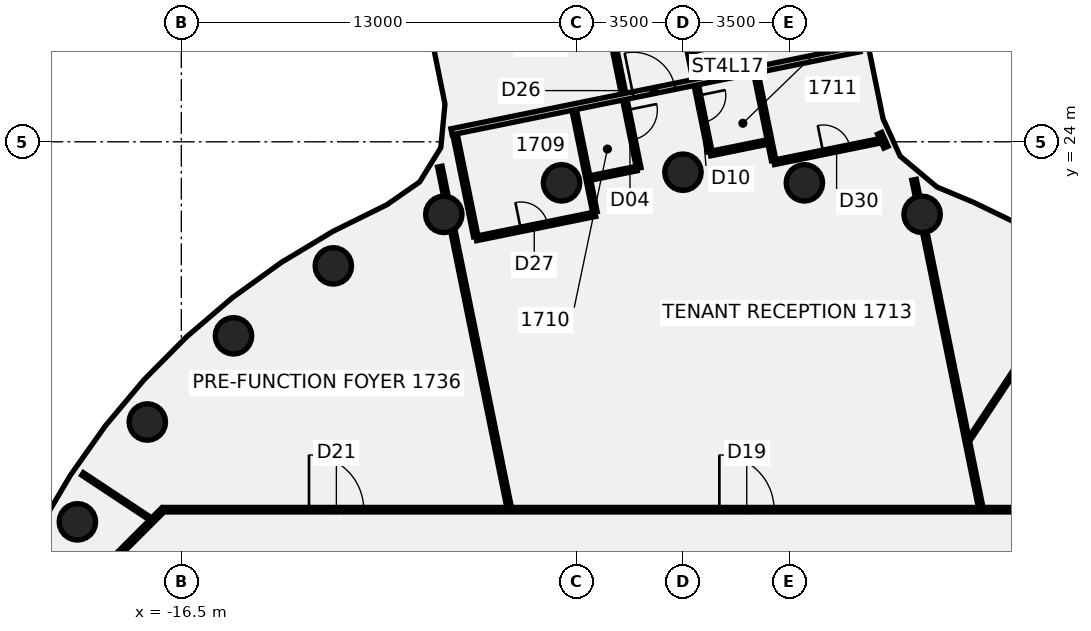
"""IFC4 building model, lengths in metres.
Left out: names, types, materials, properties, quantities, classifications, styles, units other than length and angle.
Written with IfcOpenShell. Run it as: python <this file> out.ifc"""

import sys

from ifc_helpers import new_model, si_unit, direction, frame, frame_2d, origin, origin_2d, place, context, subcontext, project, spatial, rectangle, circle, extrude, element, fill, save


model = new_model("IFC4")
c1 = context("Model", 3, precision=1e-05, world=origin(), true_north=direction((0.0, 1.0)))
c2 = subcontext(c1, "Body", "Model", "MODEL_VIEW")
j1 = project(units=[si_unit("LENGTHUNIT", "METRE"), si_unit("PLANEANGLEUNIT", "RADIAN")], contexts=[c1])
p1 = place(None, origin())
s1 = spatial("IfcSite", under=j1, at=p1, CompositionType="ELEMENT")
p2 = place(p1, origin())
s2 = spatial("IfcBuilding", under=s1, at=p2, CompositionType="ELEMENT")
p3 = place(p2, frame((0.0, 0.0, 75.25)))
s3 = spatial("IfcBuildingStorey", under=s2, at=p3, CompositionType="ELEMENT", Elevation=75.25)
for number, where, z_axis, x_axis in (
    (1, (7.866, 21.613, -0.14), (0.0, 0.0, 1.0), (1.0, 0.0, 0.0)),
    (2, (3.994, 22.651, -0.14), (0.0, 0.0, 1.0), (1.0, 0.0, 0.0)),
    (3, (0.0, 23.0, -0.14), (0.0, 0.0, 1.0), (1.0, 0.0, 0.0)),
    (4, (-3.994, 22.651, -0.14), (0.0, 0.0, 1.0), (1.0, 0.0, 0.0)),
    (5, (-7.866, 21.613, -0.14), (0.0, 0.0, 1.0), (1.0, 0.0, 0.0)),
    (6, (-11.5, 19.919, -0.14), (0.0, 0.0, 1.0), (1.0, 0.0, 0.0)),
    (7, (-14.784, 17.619, -0.14), (0.0, 0.0, 1.0), (1.0, 0.0, 0.0)),
    (8, (-17.619, 14.784, -0.14), (0.0, 0.0, 1.0), (1.0, 0.0, 0.0)),
    (9, (-19.919, 11.5, -0.14), (0.0, 0.0, 1.0), (1.0, 0.0, 0.0)),
):
    element("IfcColumn", number, at=place(p3, frame(where, z_axis=z_axis, x_axis=x_axis)), inside=s3, PredefinedType="COLUMN", context=c2, shape_type="SweptSolid", body=[
        extrude(circle(Radius=0.6, at=origin_2d()), origin(), (0.0, 0.0, 1.0), 3.71),
    ])
p4 = place(p3, frame((-7.997, 23.185, 0.0), z_axis=(0.0, 0.0, 1.0), x_axis=(0.199166137736, -0.979965738982, 0.0)))
e10 = element("IfcWall", 10, at=p4, inside=s3, PredefinedType="PARTITIONING", context=c2, shape_type="SweptSolid", body=[
    extrude(rectangle(XDim=1.0, YDim=0.15, at=frame_2d((0.5, 0.0))), origin(), (0.0, 0.0, 1.0), 2.97),
])
p5 = place(p3, frame((-7.569, 21.083, 0.0), z_axis=(0.0, 0.0, 1.0), x_axis=(0.199292052779, -0.979940139855, 0.0)))
e11 = element("IfcWall", 11, at=p5, inside=s3, PredefinedType="PARTITIONING", context=c2, shape_type="SweptSolid", body=[
    extrude(rectangle(XDim=9.296, YDim=0.15, at=frame_2d((4.648, 0.0))), origin(), (0.0, 0.0, 1.0), 2.97),
])
p6 = place(p3, frame((-7.499, 24.251, 0.0), z_axis=(0.0, 0.0, 1.0), x_axis=(0.199153914045, -0.97996822322, 0.0)))
e12 = element("IfcWall", 12, at=p6, inside=s3, PredefinedType="PARTITIONING", context=c2, shape_type="SweptSolid", body=[
    extrude(rectangle(XDim=3.43, YDim=0.15, at=frame_2d((1.715, 0.0))), origin(), (0.0, 0.0, 1.0), 2.97),
])
p7 = place(p3, frame((-4.608, 38.64, 0.0), z_axis=(0.0, 0.0, 1.0), x_axis=(0.199328235369, -0.979932780646, 0.0)))
e13 = element("IfcWall", 13, at=p7, inside=s3, PredefinedType="PARTITIONING", context=c2, shape_type="SweptSolid", body=[
    extrude(rectangle(XDim=15.825, YDim=0.15, at=frame_2d((7.912, 0.0))), origin(), (0.0, 0.0, 1.0), 2.87),
])
p8 = place(p7, frame((13.875, 0.0, 0.0)))
e14 = element("IfcOpeningElement", 14, at=p8, cuts=e13, PredefinedType="OPENING", context=c2, shape_type="SweptSolid", body=[
    extrude(rectangle(XDim=1.0, YDim=2.1, at=frame_2d((0.5, 1.05))), frame((0.0, 0.085, 0.0), z_axis=(0.0, -1.0, 0.0), x_axis=(1.0, 0.0, 0.0)), (0.0, 0.0, 1.0), 0.17),
])
p9 = place(p7, frame((6.825, 0.0, 0.0)))
e15 = element("IfcOpeningElement", 15, at=p9, cuts=e13, PredefinedType="OPENING", context=c2, shape_type="SweptSolid", body=[
    extrude(rectangle(XDim=0.9, YDim=2.1, at=frame_2d((0.45, 1.05))), frame((0.0, 0.085, 0.0), z_axis=(0.0, -1.0, 0.0), x_axis=(1.0, 0.0, 0.0)), (0.0, 0.0, 1.0), 0.17),
])
p10 = place(p7, frame((1.275, 0.0, 0.0)))
e16 = element("IfcOpeningElement", 16, at=p10, cuts=e13, PredefinedType="OPENING", context=c2, shape_type="SweptSolid", body=[
    extrude(rectangle(XDim=0.9, YDim=2.1, at=frame_2d((0.45, 1.05))), frame((0.0, 0.085, 0.0), z_axis=(0.0, -1.0, 0.0), x_axis=(1.0, 0.0, 0.0)), (0.0, 0.0, 1.0), 0.17),
])
p11 = place(p7, frame((9.825, 0.0, 0.0)))
e17 = element("IfcOpeningElement", 17, at=p11, cuts=e13, PredefinedType="OPENING", context=c2, shape_type="SweptSolid", body=[
    extrude(rectangle(XDim=1.8, YDim=2.1, at=frame_2d((0.9, 1.05))), frame((0.0, 0.085, 0.0), z_axis=(0.0, -1.0, 0.0), x_axis=(1.0, 0.0, 0.0)), (0.0, 0.0, 1.0), 0.17),
])
p12 = place(p3, frame((-3.579, 25.048, 0.0), z_axis=(0.0, 0.0, 1.0), x_axis=(0.199140023723, -0.979971045976, 0.0)))
e18 = element("IfcWall", 18, at=p12, inside=s3, PredefinedType="PARTITIONING", context=c2, shape_type="SweptSolid", body=[
    extrude(rectangle(XDim=3.43, YDim=0.15, at=frame_2d((1.715, 0.0))), origin(), (0.0, 0.0, 1.0), 2.87),
])
p13 = place(p3, frame((0.228, 26.904, 0.0), z_axis=(0.0, 0.0, 1.0), x_axis=(0.199254798656, -0.97994771555, 0.0)))
e19 = element("IfcWall", 19, at=p13, inside=s3, PredefinedType="PARTITIONING", context=c2, shape_type="SweptSolid", body=[
    extrude(rectangle(XDim=3.29, YDim=0.15, at=frame_2d((1.645, 0.0))), origin(), (0.0, 0.0, 1.0), 2.87),
])
p14 = place(p13, frame((1.41, 0.0, 0.0)))
e20 = element("IfcOpeningElement", 20, at=p14, cuts=e19, PredefinedType="OPENING", context=c2, shape_type="SweptSolid", body=[
    extrude(rectangle(XDim=0.9, YDim=2.1, at=frame_2d((0.45, 1.05))), frame((0.0, 0.085, 0.0), z_axis=(0.0, -1.0, 0.0), x_axis=(1.0, 0.0, 0.0)), (0.0, 0.0, 1.0), 0.17),
])
p15 = place(p3, frame((2.399, 26.263, 0.0), z_axis=(0.0, 0.0, 1.0), x_axis=(0.199208761574, -0.97995707524, 0.0)))
e21 = element("IfcWall", 21, at=p15, inside=s3, PredefinedType="PARTITIONING", context=c2, shape_type="SweptSolid", body=[
    extrude(rectangle(XDim=2.929, YDim=0.15, at=frame_2d((1.464, 0.0))), origin(), (0.0, 0.0, 1.0), 2.87),
])
p16 = place(p3, frame((7.603, 22.751, 0.0), z_axis=(0.0, 0.0, 1.0), x_axis=(0.1988702456, -0.980025828953, 0.0)))
e22 = element("IfcWall", 22, at=p16, inside=s3, PredefinedType="PARTITIONING", context=c2, shape_type="SweptSolid", body=[
    extrude(rectangle(XDim=0.579, YDim=0.15, at=frame_2d((0.29, 0.0))), origin(), (0.0, 0.0, 1.0), 2.97),
])
p17 = place(p3, frame((7.954, 21.026, 0.0), z_axis=(0.0, 0.0, 1.0), x_axis=(0.19921022079, -0.979956778604, 0.0)))
e23 = element("IfcWall", 23, at=p17, inside=s3, PredefinedType="PARTITIONING", context=c2, shape_type="SweptSolid", body=[
    extrude(rectangle(XDim=9.238, YDim=0.15, at=frame_2d((4.619, 0.0))), origin(), (0.0, 0.0, 1.0), 2.97),
])
p18 = place(p3, frame((-19.75, 13.076, 0.0), z_axis=(0.0, 0.0, 1.0), x_axis=(0.833829046668, -0.552022753999, 0.0)))
e24 = element("IfcWall", 24, at=p18, inside=s3, PredefinedType="PARTITIONING", context=c2, shape_type="SweptSolid", body=[
    extrude(rectangle(XDim=2.675, YDim=0.1, at=frame_2d((1.338, 0.0))), origin(), (0.0, 0.0, 1.0), 2.97),
])
p19 = place(p3, frame((-17.065, 11.9, 0.0), z_axis=(0.0, 0.0, 1.0), x_axis=(1.0, 0.0, 0.0)))
e25 = element("IfcWall", 25, at=p19, inside=s3, PredefinedType="PARTITIONING", context=c2, shape_type="SweptSolid", body=[
    extrude(rectangle(XDim=34.165, YDim=0.15, at=frame_2d((17.083, 0.0))), origin(), (0.0, 0.0, 1.0), 2.97),
])
p20 = place(p19, frame((18.263, 0.0, 0.0)))
e26 = element("IfcOpeningElement", 26, at=p20, cuts=e25, PredefinedType="OPENING", context=c2, shape_type="SweptSolid", body=[
    extrude(rectangle(XDim=1.8, YDim=2.1, at=frame_2d((0.9, 1.05))), frame((0.0, 0.085, 0.0), z_axis=(0.0, -1.0, 0.0), x_axis=(1.0, 0.0, 0.0)), (0.0, 0.0, 1.0), 0.17),
])
p21 = place(p19, frame((30.324, 0.0, 0.0)))
e27 = element("IfcOpeningElement", 27, at=p21, cuts=e25, PredefinedType="OPENING", context=c2, shape_type="SweptSolid", body=[
    extrude(rectangle(XDim=1.8, YDim=2.1, at=frame_2d((0.9, 1.05))), frame((0.0, 0.085, 0.0), z_axis=(0.0, -1.0, 0.0), x_axis=(1.0, 0.0, 0.0)), (0.0, 0.0, 1.0), 0.17),
])
p22 = place(p19, frame((4.765, 0.0, 0.0)))
e28 = element("IfcOpeningElement", 28, at=p22, cuts=e25, PredefinedType="OPENING", context=c2, shape_type="SweptSolid", body=[
    extrude(rectangle(XDim=1.8, YDim=2.1, at=frame_2d((0.9, 1.05))), frame((0.0, 0.085, 0.0), z_axis=(0.0, -1.0, 0.0), x_axis=(1.0, 0.0, 0.0)), (0.0, 0.0, 1.0), 0.17),
])
p23 = place(p3, frame((-7.613, 24.33, 0.0), z_axis=(0.0, 0.0, 1.0), x_axis=(0.979948993984, 0.199248511138, 0.0)))
e29 = element("IfcWall", 29, at=p23, inside=s3, PredefinedType="PARTITIONING", context=c2, shape_type="SweptSolid", body=[
    extrude(rectangle(XDim=13.695, YDim=0.2, at=frame_2d((6.848, 0.0))), origin(), (0.0, 0.0, 1.0), 2.87),
])
p24 = place(p23, frame((6.096, 0.0, 0.0)))
e30 = element("IfcOpeningElement", 30, at=p24, cuts=e29, PredefinedType="OPENING", context=c2, shape_type="SweptSolid", body=[
    extrude(rectangle(XDim=1.4, YDim=2.1, at=frame_2d((0.7, 1.05))), frame((0.0, 0.11, 0.0), z_axis=(0.0, -1.0, 0.0), x_axis=(1.0, 0.0, 0.0)), (0.0, 0.0, 1.0), 0.22),
])
p25 = place(p3, frame((-6.802, 20.821, 0.0), z_axis=(0.0, 0.0, 1.0), x_axis=(0.979956053702, 0.199213786702, 0.0)))
e31 = element("IfcWall", 31, at=p25, inside=s3, PredefinedType="PARTITIONING", context=c2, shape_type="SweptSolid", body=[
    extrude(rectangle(XDim=4.0, YDim=0.15, at=frame_2d((2.0, 0.0))), origin(), (0.0, 0.0, 1.0), 2.97),
])
p26 = place(p25, frame((1.5, 0.0, 0.0)))
e32 = element("IfcOpeningElement", 32, at=p26, cuts=e31, PredefinedType="OPENING", context=c2, shape_type="SweptSolid", body=[
    extrude(rectangle(XDim=0.9, YDim=2.1, at=frame_2d((0.45, 1.05))), frame((0.0, 0.085, 0.0), z_axis=(0.0, -1.0, 0.0), x_axis=(1.0, 0.0, 0.0)), (0.0, 0.0, 1.0), 0.17),
])
p27 = place(p3, frame((-3.048, 22.81, 0.0), z_axis=(0.0, 0.0, 1.0), x_axis=(0.980015066338, 0.198923276041, 0.0)))
e33 = element("IfcWall", 33, at=p27, inside=s3, PredefinedType="PARTITIONING", context=c2, shape_type="SweptSolid", body=[
    extrude(rectangle(XDim=1.555, YDim=0.15, at=frame_2d((0.777, 0.0))), origin(), (0.0, 0.0, 1.0), 2.97),
])
p28 = place(p3, frame((0.897, 23.611, 0.0), z_axis=(0.0, 0.0, 1.0), x_axis=(0.980000847633, 0.19899331305, 0.0)))
e34 = element("IfcWall", 34, at=p28, inside=s3, PredefinedType="PARTITIONING", context=c2, shape_type="SweptSolid", body=[
    extrude(rectangle(XDim=1.925, YDim=0.15, at=frame_2d((0.962, 0.0))), origin(), (0.0, 0.0, 1.0), 2.97),
])
p29 = place(p3, frame((2.996, 23.324, 0.0), z_axis=(0.0, 0.0, 1.0), x_axis=(0.979983772103, 0.199077388004, 0.0)))
e35 = element("IfcWall", 35, at=p29, inside=s3, PredefinedType="PARTITIONING", context=c2, shape_type="SweptSolid", body=[
    extrude(rectangle(XDim=3.566, YDim=0.15, at=frame_2d((1.783, 0.0))), origin(), (0.0, 0.0, 1.0), 2.97),
])
p30 = place(p29, frame((1.65, 0.0, 0.0)))
e36 = element("IfcOpeningElement", 36, at=p30, cuts=e35, PredefinedType="OPENING", context=c2, shape_type="SweptSolid", body=[
    extrude(rectangle(XDim=0.9, YDim=2.1, at=frame_2d((0.45, 1.05))), frame((0.0, 0.085, 0.0), z_axis=(0.0, -1.0, 0.0), x_axis=(1.0, 0.0, 0.0)), (0.0, 0.0, 1.0), 0.17),
])
p31 = place(p3, frame((-18.872, 10.128, 0.0), z_axis=(0.0, 0.0, 1.0), x_axis=(0.707106781187, 0.707106781187, 0.0)))
e37 = element("IfcWall", 37, at=p31, inside=s3, PredefinedType="PARTITIONING", context=c2, shape_type="SweptSolid", body=[
    extrude(rectangle(XDim=2.505, YDim=0.15, at=frame_2d((1.253, 0.0))), origin(), (0.0, 0.0, 1.0), 2.97),
])
p32 = place(p3, frame((9.431, 14.237, 0.0), z_axis=(0.0, 0.0, 1.0), x_axis=(0.552140030004, 0.833751394162, 0.0)))
e38 = element("IfcWall", 38, at=p32, inside=s3, PredefinedType="PARTITIONING", context=c2, shape_type="SweptSolid", body=[
    extrude(rectangle(XDim=6.609, YDim=0.1, at=frame_2d((3.304, 0.0))), origin(), (0.0, 0.0, 1.0), 2.97),
])
p33 = place(p3, frame((6.678, 23.823, 0.0), z_axis=(0.0, 0.0, 1.0), x_axis=(-0.414501717586, 0.91004852954, 0.0)))
e39 = element("IfcWall", 39, at=p33, inside=s3, PredefinedType="PARTITIONING", context=c2, shape_type="SweptSolid", body=[
    extrude(rectangle(XDim=0.5, YDim=0.15, at=frame_2d((0.25, 0.0))), origin(), (0.0, 0.0, 1.0), 2.97),
])
p34 = place(p3, frame((0.318, 26.963, -0.14), z_axis=(0.0, 0.0, 1.0), x_axis=(-0.199254586655, 0.979947758657, 0.0)))
e40 = element("IfcWall", 40, at=p34, inside=s3, PredefinedType="SHEAR", context=c2, shape_type="SweptSolid", body=[
    extrude(rectangle(XDim=6.7, YDim=0.2, at=frame_2d((3.35, 0.0))), origin(), (0.0, 0.0, 1.0), 3.01),
])
p35 = place(p34, frame((0.35, 0.0, 0.0)))
e41 = element("IfcOpeningElement", 41, at=p35, cuts=e40, PredefinedType="OPENING", context=c2, shape_type="SweptSolid", body=[
    extrude(rectangle(XDim=1.0, YDim=2.1, at=frame_2d((0.5, 1.05))), frame((0.0, 0.11, 0.0), z_axis=(0.0, -1.0, 0.0), x_axis=(1.0, 0.0, 0.0)), (0.0, 0.0, 1.0), 0.22),
])
p36 = place(p8, frame((1.0, 0.0, 0.0), z_axis=(0.0, 0.0, 1.0), x_axis=(-1.0, 0.0, 0.0)))
e42 = element("IfcDoor", 42, at=p36, inside=s3, OperationType="SINGLE_SWING_RIGHT", PredefinedType="DOOR", context=c2, shape_type="SweptSolid", body=[
    extrude(rectangle(XDim=1.0, YDim=2.1, at=frame_2d((0.5, 1.05))), frame((0.0, 0.025, 0.0), z_axis=(0.0, -1.0, 0.0), x_axis=(1.0, 0.0, 0.0)), (0.0, 0.0, 1.0), 0.05),
])
fill(e14, e42)
p37 = place(p14, origin())
e43 = element("IfcDoor", 43, at=p37, inside=s3, OperationType="SINGLE_SWING_LEFT", PredefinedType="DOOR", context=c2, shape_type="SweptSolid", body=[
    extrude(rectangle(XDim=0.9, YDim=2.1, at=frame_2d((0.45, 1.05))), frame((0.0, 0.025, 0.0), z_axis=(0.0, -1.0, 0.0), x_axis=(1.0, 0.0, 0.0)), (0.0, 0.0, 1.0), 0.05),
])
fill(e20, e43)
p38 = place(p20, frame((1.8, 0.0, 0.0), z_axis=(0.0, 0.0, 1.0), x_axis=(-1.0, 0.0, 0.0)))
e44 = element("IfcDoor", 44, at=p38, inside=s3, OperationType="DOUBLE_DOOR_SINGLE_SWING", PredefinedType="DOOR", context=c2, shape_type="SweptSolid", body=[
    extrude(rectangle(XDim=1.8, YDim=2.1, at=frame_2d((0.9, 1.05))), frame((0.0, 0.025, 0.0), z_axis=(0.0, -1.0, 0.0), x_axis=(1.0, 0.0, 0.0)), (0.0, 0.0, 1.0), 0.05),
])
fill(e26, e44)
p39 = place(p22, origin())
e45 = element("IfcDoor", 45, at=p39, inside=s3, OperationType="DOUBLE_DOOR_SINGLE_SWING", PredefinedType="DOOR", context=c2, shape_type="SweptSolid", body=[
    extrude(rectangle(XDim=1.8, YDim=2.1, at=frame_2d((0.9, 1.05))), frame((0.0, 0.025, 0.0), z_axis=(0.0, -1.0, 0.0), x_axis=(1.0, 0.0, 0.0)), (0.0, 0.0, 1.0), 0.05),
])
fill(e28, e45)
p40 = place(p24, frame((1.4, 0.0, 0.0), z_axis=(0.0, 0.0, 1.0), x_axis=(-1.0, 0.0, 0.0)))
e46 = element("IfcDoor", 46, at=p40, inside=s3, OperationType="DOUBLE_DOOR_SINGLE_SWING", PredefinedType="DOOR", context=c2, shape_type="SweptSolid", body=[
    extrude(rectangle(XDim=1.4, YDim=2.1, at=frame_2d((0.7, 1.05))), frame((0.0, 0.025, 0.0), z_axis=(0.0, -1.0, 0.0), x_axis=(1.0, 0.0, 0.0)), (0.0, 0.0, 1.0), 0.05),
])
fill(e30, e46)
p41 = place(p26, origin())
e47 = element("IfcDoor", 47, at=p41, inside=s3, OperationType="SINGLE_SWING_RIGHT", PredefinedType="DOOR", context=c2, shape_type="SweptSolid", body=[
    extrude(rectangle(XDim=0.9, YDim=2.1, at=frame_2d((0.45, 1.05))), frame((0.0, 0.025, 0.0), z_axis=(0.0, -1.0, 0.0), x_axis=(1.0, 0.0, 0.0)), (0.0, 0.0, 1.0), 0.05),
])
fill(e32, e47)
p42 = place(p30, origin())
e48 = element("IfcDoor", 48, at=p42, inside=s3, OperationType="SINGLE_SWING_LEFT", PredefinedType="DOOR", context=c2, shape_type="SweptSolid", body=[
    extrude(rectangle(XDim=0.9, YDim=2.1, at=frame_2d((0.45, 1.05))), frame((0.0, 0.025, 0.0), z_axis=(0.0, -1.0, 0.0), x_axis=(1.0, 0.0, 0.0)), (0.0, 0.0, 1.0), 0.05),
])
fill(e36, e48)
save(model, sys.argv[1])
